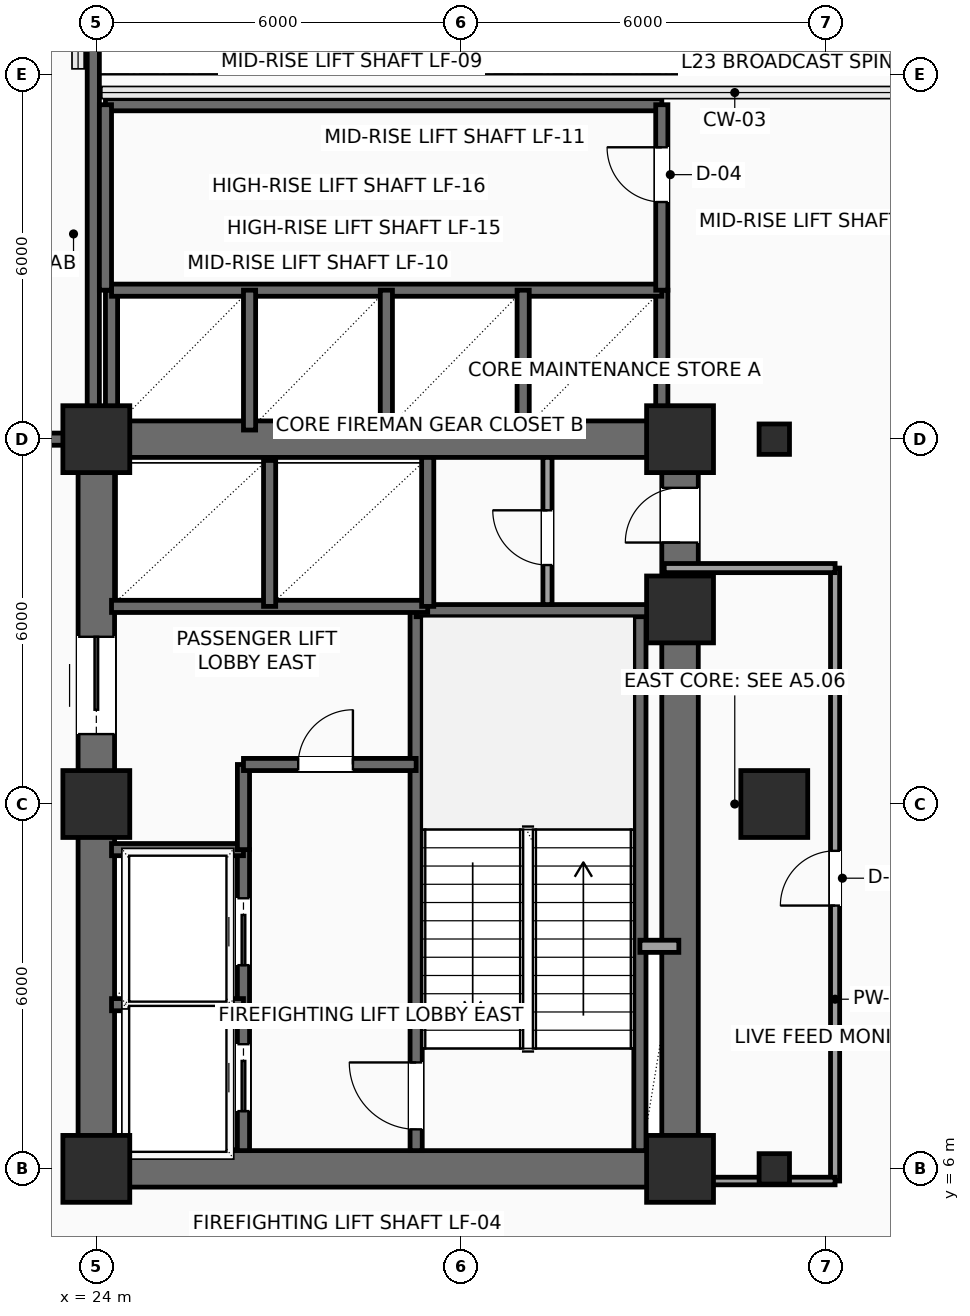
"""IFC4 building model, lengths in metres.
Left out: names, types, materials, properties, quantities, classifications, styles, units other than length and angle.
Written with IfcOpenShell. Run it as: python <this file> out.ifc"""

import sys

from ifc_helpers import new_model, si_unit, direction, frame, frame_2d, origin, origin_2d, place, context, subcontext, project, spatial, rectangle, hollow_rectangle, extrude, element, fill, save


model = new_model("IFC4")
c1 = context("Model", 3, precision=1e-05, world=origin(), true_north=direction((0.0, 1.0)))
c2 = subcontext(c1, "Body", "Model", "MODEL_VIEW")
j1 = project(units=[si_unit("LENGTHUNIT", "METRE"), si_unit("PLANEANGLEUNIT", "RADIAN")], contexts=[c1])
p1 = place(None, origin())
s1 = spatial("IfcSite", under=j1, at=p1, CompositionType="ELEMENT")
p2 = place(p1, origin())
s2 = spatial("IfcBuilding", under=s1, at=p2, CompositionType="ELEMENT")
p3 = place(p2, frame((0.0, 0.0, 99.6)))
s3 = spatial("IfcBuildingStorey", under=s2, at=p3, CompositionType="ELEMENT", Elevation=99.6)
for number, where, z_axis, x_axis in (
    (1, (24.0, 6.0, 0.0), (0.0, 0.0, 1.0), (1.0, 0.0, 0.0)),
    (2, (24.0, 12.0, 0.0), (0.0, 0.0, 1.0), (1.0, 0.0, 0.0)),
    (3, (24.0, 18.0, 0.0), (0.0, 0.0, 1.0), (1.0, 0.0, 0.0)),
    (4, (33.6, 6.0, 0.0), (0.0, 0.0, 1.0), (1.0, 0.0, 0.0)),
    (5, (33.6, 15.2, 0.0), (0.0, 0.0, 1.0), (1.0, 0.0, 0.0)),
    (6, (33.6, 18.0, 0.0), (0.0, 0.0, 1.0), (1.0, 0.0, 0.0)),
):
    element("IfcColumn", number, at=place(p3, frame(where, z_axis=z_axis, x_axis=x_axis)), inside=s3, PredefinedType="COLUMN", context=c2, shape_type="SweptSolid", body=[
        extrude(rectangle(XDim=1.1, YDim=1.1, at=origin_2d()), origin(), (0.0, 0.0, 1.0), 3.75),
    ])
p4 = place(p3, frame((35.15, 6.0, 0.0), z_axis=(0.0, 0.0, 1.0), x_axis=(1.0, 0.0, 0.0)))
e7 = element("IfcColumn", 7, at=p4, inside=s3, PredefinedType="COLUMN", context=c2, shape_type="SweptSolid", body=[
    extrude(hollow_rectangle(XDim=0.5, YDim=0.5, WallThickness=0.025, InnerFilletRadius=0.025, OuterFilletRadius=0.04, at=origin_2d()), origin(), (0.0, 0.0, 1.0), 3.75),
])
p5 = place(p3, frame((35.15, 12.0, 0.0), z_axis=(0.0, 0.0, 1.0), x_axis=(1.0, 0.0, 0.0)))
e8 = element("IfcColumn", 8, at=p5, inside=s3, PredefinedType="COLUMN", context=c2, shape_type="SweptSolid", body=[
    extrude(rectangle(XDim=1.1, YDim=1.1, at=origin_2d()), origin(), (0.0, 0.0, 1.0), 3.75),
])
p6 = place(p3, frame((35.15, 18.0, 0.0), z_axis=(0.0, 0.0, 1.0), x_axis=(1.0, 0.0, 0.0)))
e9 = element("IfcColumn", 9, at=p6, inside=s3, PredefinedType="COLUMN", context=c2, shape_type="SweptSolid", body=[
    extrude(hollow_rectangle(XDim=0.5, YDim=0.5, WallThickness=0.025, InnerFilletRadius=0.025, OuterFilletRadius=0.04, at=origin_2d()), origin(), (0.0, 0.0, 1.0), 3.75),
])
for number, where, z_axis, x_axis in (
    (10, (24.0, 6.0, 0.0), (0.0, 0.0, 1.0), (1.0, 0.0, 0.0)),
    (11, (24.0, 18.0, 0.0), (0.0, 0.0, 1.0), (1.0, 0.0, 0.0)),
):
    element("IfcWall", number, at=place(p3, frame(where, z_axis=z_axis, x_axis=x_axis)), inside=s3, PredefinedType="SHEAR", context=c2, shape_type="SweptSolid", body=[
        extrude(rectangle(XDim=9.6, YDim=0.6, at=frame_2d((4.8, 0.0))), origin(), (0.0, 0.0, 1.0), 3.525),
    ])
p7 = place(p3, frame((24.0, 6.0, 0.0), z_axis=(0.0, 0.0, 1.0), x_axis=(0.0, 1.0, 0.0)))
e12 = element("IfcWall", 12, at=p7, inside=s3, PredefinedType="SHEAR", context=c2, shape_type="SweptSolid", body=[
    extrude(rectangle(XDim=12.0, YDim=0.6, at=frame_2d((6.0, 0.0))), origin(), (0.0, 0.0, 1.0), 3.525),
])
p8 = place(p7, frame((7.15, 0.0, 0.0)))
e13 = element("IfcOpeningElement", 13, at=p8, cuts=e12, PredefinedType="OPENING", context=c2, shape_type="SweptSolid", body=[
    extrude(rectangle(XDim=1.6, YDim=2.3, at=frame_2d((0.8, 1.15))), frame((0.0, 0.31, 0.0), z_axis=(0.0, -1.0, 0.0), x_axis=(1.0, 0.0, 0.0)), (0.0, 0.0, 1.0), 0.62),
])
p9 = place(p3, frame((33.6, 6.0, 0.0), z_axis=(0.0, 0.0, 1.0), x_axis=(0.0, 1.0, 0.0)))
e14 = element("IfcWall", 14, at=p9, inside=s3, PredefinedType="SHEAR", context=c2, shape_type="SweptSolid", body=[
    extrude(rectangle(XDim=12.0, YDim=0.6, at=frame_2d((6.0, 0.0))), origin(), (0.0, 0.0, 1.0), 3.525),
])
p10 = place(p9, frame((10.3, 0.0, 0.0)))
e15 = element("IfcOpeningElement", 15, at=p10, cuts=e14, PredefinedType="OPENING", context=c2, shape_type="SweptSolid", body=[
    extrude(rectangle(XDim=0.9, YDim=2.15, at=frame_2d((0.45, 1.075))), frame((0.0, 0.31, 0.0), z_axis=(0.0, -1.0, 0.0), x_axis=(1.0, 0.0, 0.0)), (0.0, 0.0, 1.0), 0.62),
])
p11 = place(p3, frame((29.26, 6.3, 0.0), z_axis=(0.0, 0.0, 1.0), x_axis=(0.0, 1.0, 0.0)))
e16 = element("IfcWall", 16, at=p11, inside=s3, PredefinedType="SHEAR", context=c2, shape_type="SweptSolid", body=[
    extrude(rectangle(XDim=8.88, YDim=0.2, at=frame_2d((4.44, 0.0))), origin(), (0.0, 0.0, 1.0), 3.525),
])
p12 = place(p11, frame((0.35, 0.0, 0.0)))
e17 = element("IfcOpeningElement", 17, at=p12, cuts=e16, PredefinedType="OPENING", context=c2, shape_type="SweptSolid", body=[
    extrude(rectangle(XDim=1.1, YDim=2.2, at=frame_2d((0.55, 1.1))), frame((0.0, 0.11, 0.0), z_axis=(0.0, -1.0, 0.0), x_axis=(1.0, 0.0, 0.0)), (0.0, 0.0, 1.0), 0.22),
])
p13 = place(p3, frame((32.94, 6.3, 0.0), z_axis=(0.0, 0.0, 1.0), x_axis=(0.0, 1.0, 0.0)))
e18 = element("IfcWall", 18, at=p13, inside=s3, PredefinedType="SHEAR", context=c2, shape_type="SweptSolid", body=[
    extrude(rectangle(XDim=8.88, YDim=0.2, at=frame_2d((4.44, 0.0))), origin(), (0.0, 0.0, 1.0), 3.525),
])
p14 = place(p3, frame((29.26, 15.18, 0.0), z_axis=(0.0, 0.0, 1.0), x_axis=(1.0, 0.0, 0.0)))
e19 = element("IfcWall", 19, at=p14, inside=s3, PredefinedType="SHEAR", context=c2, shape_type="SweptSolid", body=[
    extrude(rectangle(XDim=4.04, YDim=0.2, at=frame_2d((2.02, 0.0))), origin(), (0.0, 0.0, 1.0), 3.525),
])
p15 = place(p3, frame((26.42, 6.3, 0.0), z_axis=(0.0, 0.0, 1.0), x_axis=(0.0, 1.0, 0.0)))
e20 = element("IfcWall", 20, at=p15, inside=s3, PredefinedType="SHEAR", context=c2, shape_type="SweptSolid", body=[
    extrude(rectangle(XDim=4.95, YDim=0.2, at=frame_2d((2.475, 0.0))), origin(), (0.0, 0.0, 1.0), 3.525),
])
p16 = place(p15, frame((0.65, 0.0, 0.0)))
e21 = element("IfcOpeningElement", 21, at=p16, cuts=e20, PredefinedType="OPENING", context=c2, shape_type="SweptSolid", body=[
    extrude(rectangle(XDim=1.1, YDim=2.2, at=frame_2d((0.55, 1.1))), frame((0.0, 0.11, 0.0), z_axis=(0.0, -1.0, 0.0), x_axis=(1.0, 0.0, 0.0)), (0.0, 0.0, 1.0), 0.22),
])
p17 = place(p15, frame((3.05, 0.0, 0.0)))
e22 = element("IfcOpeningElement", 22, at=p17, cuts=e20, PredefinedType="OPENING", context=c2, shape_type="SweptSolid", body=[
    extrude(rectangle(XDim=1.1, YDim=2.2, at=frame_2d((0.55, 1.1))), frame((0.0, 0.11, 0.0), z_axis=(0.0, -1.0, 0.0), x_axis=(1.0, 0.0, 0.0)), (0.0, 0.0, 1.0), 0.22),
])
for number, where, z_axis, x_axis in (
    (23, (24.25, 8.7, 0.0), (0.0, 0.0, 1.0), (1.0, 0.0, 0.0)),
    (24, (24.25, 11.25, 0.0), (0.0, 0.0, 1.0), (1.0, 0.0, 0.0)),
):
    element("IfcWall", number, at=place(p3, frame(where, z_axis=z_axis, x_axis=x_axis)), inside=s3, PredefinedType="SHEAR", context=c2, shape_type="SweptSolid", body=[
        extrude(rectangle(XDim=2.17, YDim=0.2, at=frame_2d((1.085, 0.0))), origin(), (0.0, 0.0, 1.0), 3.525),
    ])
p18 = place(p3, frame((26.42, 11.25, 0.0), z_axis=(0.0, 0.0, 1.0), x_axis=(0.0, 1.0, 0.0)))
e25 = element("IfcWall", 25, at=p18, inside=s3, PredefinedType="SHEAR", context=c2, shape_type="SweptSolid", body=[
    extrude(rectangle(XDim=1.4, YDim=0.2, at=frame_2d((0.7, 0.0))), origin(), (0.0, 0.0, 1.0), 3.525),
])
p19 = place(p3, frame((26.42, 12.65, 0.0), z_axis=(0.0, 0.0, 1.0), x_axis=(1.0, 0.0, 0.0)))
e26 = element("IfcWall", 26, at=p19, inside=s3, PredefinedType="SHEAR", context=c2, shape_type="SweptSolid", body=[
    extrude(rectangle(XDim=2.84, YDim=0.2, at=frame_2d((1.42, 0.0))), origin(), (0.0, 0.0, 1.0), 3.525),
])
p20 = place(p19, frame((0.9, 0.0, 0.0)))
e27 = element("IfcOpeningElement", 27, at=p20, cuts=e26, PredefinedType="OPENING", context=c2, shape_type="SweptSolid", body=[
    extrude(rectangle(XDim=0.9, YDim=2.15, at=frame_2d((0.45, 1.075))), frame((0.0, 0.11, 0.0), z_axis=(0.0, -1.0, 0.0), x_axis=(1.0, 0.0, 0.0)), (0.0, 0.0, 1.0), 0.22),
])
p21 = place(p3, frame((32.94, 9.66, 0.0), z_axis=(0.0, 0.0, 1.0), x_axis=(1.0, 0.0, 0.0)))
e28 = element("IfcWall", 28, at=p21, inside=s3, PredefinedType="SOLIDWALL", context=c2, shape_type="SweptSolid", body=[
    extrude(rectangle(XDim=0.64, YDim=0.2, at=frame_2d((0.32, 0.0))), origin(), (0.0, 0.0, 1.0), 3.525),
])
p22 = place(p3, frame((24.25, 15.25, 0.0), z_axis=(0.0, 0.0, 1.0), x_axis=(1.0, 0.0, 0.0)))
e29 = element("IfcWall", 29, at=p22, inside=s3, PredefinedType="SHEAR", context=c2, shape_type="SweptSolid", body=[
    extrude(rectangle(XDim=5.2, YDim=0.2, at=frame_2d((2.6, 0.0))), origin(), (0.0, 0.0, 1.0), 3.525),
])
p23 = place(p3, frame((26.85, 15.25, 0.0), z_axis=(0.0, 0.0, 1.0), x_axis=(0.0, 1.0, 0.0)))
e30 = element("IfcWall", 30, at=p23, inside=s3, PredefinedType="SHEAR", context=c2, shape_type="SweptSolid", body=[
    extrude(rectangle(XDim=2.4, YDim=0.2, at=frame_2d((1.2, 0.0))), origin(), (0.0, 0.0, 1.0), 3.525),
])
p24 = place(p3, frame((29.45, 15.25, 0.0), z_axis=(0.0, 0.0, 1.0), x_axis=(0.0, 1.0, 0.0)))
e31 = element("IfcWall", 31, at=p24, inside=s3, PredefinedType="SHEAR", context=c2, shape_type="SweptSolid", body=[
    extrude(rectangle(XDim=2.45, YDim=0.2, at=frame_2d((1.225, 0.0))), origin(), (0.0, 0.0, 1.0), 3.525),
])
p25 = place(p3, frame((31.42, 15.28, 0.0), z_axis=(0.0, 0.0, 1.0), x_axis=(0.0, 1.0, 0.0)))
e32 = element("IfcWall", 32, at=p25, inside=s3, PredefinedType="PARTITIONING", context=c2, shape_type="SweptSolid", body=[
    extrude(rectangle(XDim=2.42, YDim=0.15, at=frame_2d((1.21, 0.0))), origin(), (0.0, 0.0, 1.0), 3.525),
])
p26 = place(p25, frame((0.65, 0.0, 0.0)))
e33 = element("IfcOpeningElement", 33, at=p26, cuts=e32, PredefinedType="OPENING", context=c2, shape_type="SweptSolid", body=[
    extrude(rectangle(XDim=0.9, YDim=2.15, at=frame_2d((0.45, 1.075))), frame((0.0, 0.085, 0.0), z_axis=(0.0, -1.0, 0.0), x_axis=(1.0, 0.0, 0.0)), (0.0, 0.0, 1.0), 0.17),
])
p27 = place(p3, frame((20.45, 18.0, 0.0), z_axis=(0.0, 0.0, 1.0), x_axis=(1.0, 0.0, 0.0)))
e34 = element("IfcWall", 34, at=p27, inside=s3, PredefinedType="SHEAR", context=c2, shape_type="SweptSolid", body=[
    extrude(rectangle(XDim=3.5, YDim=0.2, at=frame_2d((1.75, 0.0))), origin(), (0.0, 0.0, 1.0), 3.525),
])
p28 = place(p27, frame((0.95, 0.0, 0.0)))
e35 = element("IfcOpeningElement", 35, at=p28, cuts=e34, PredefinedType="OPENING", context=c2, shape_type="SweptSolid", body=[
    extrude(rectangle(XDim=1.6, YDim=2.3, at=frame_2d((0.8, 1.15))), frame((0.0, 0.11, 0.0), z_axis=(0.0, -1.0, 0.0), x_axis=(1.0, 0.0, 0.0)), (0.0, 0.0, 1.0), 0.22),
])
p29 = place(p3, frame((23.95, 18.0, 0.0), z_axis=(0.0, 0.0, 1.0), x_axis=(0.0, 1.0, 0.0)))
e36 = element("IfcWall", 36, at=p29, inside=s3, PredefinedType="SHEAR", context=c2, shape_type="SweptSolid", body=[
    extrude(rectangle(XDim=9.3, YDim=0.2, at=frame_2d((4.65, 0.0))), origin(), (0.0, 0.0, 1.0), 3.525),
])
for number, where, z_axis, x_axis in (
    (37, (33.3, 18.1, 0.0), (0.0, 0.0, 1.0), (0.0, 1.0, 0.0)),
    (38, (24.25, 18.1, 0.0), (0.0, 0.0, 1.0), (0.0, 1.0, 0.0)),
):
    element("IfcWall", number, at=place(p3, frame(where, z_axis=z_axis, x_axis=x_axis)), inside=s3, PredefinedType="SHEAR", context=c2, shape_type="SweptSolid", body=[
        extrude(rectangle(XDim=2.35, YDim=0.2, at=frame_2d((1.175, 0.0))), origin(), (0.0, 0.0, 1.0), 3.525),
    ])
p30 = place(p3, frame((24.25, 20.45, 0.0), z_axis=(0.0, 0.0, 1.0), x_axis=(1.0, 0.0, 0.0)))
e39 = element("IfcWall", 39, at=p30, inside=s3, PredefinedType="SHEAR", context=c2, shape_type="SweptSolid", body=[
    extrude(rectangle(XDim=9.05, YDim=0.2, at=frame_2d((4.525, 0.0))), origin(), (0.0, 0.0, 1.0), 3.525),
])
for number, where, z_axis, x_axis in (
    (40, (26.52, 18.15, 0.0), (0.0, 0.0, 1.0), (0.0, 1.0, 0.0)),
    (41, (28.77, 18.15, 0.0), (0.0, 0.0, 1.0), (0.0, 1.0, 0.0)),
    (42, (31.02, 18.15, 0.0), (0.0, 0.0, 1.0), (0.0, 1.0, 0.0)),
):
    element("IfcWall", number, at=place(p3, frame(where, z_axis=z_axis, x_axis=x_axis)), inside=s3, PredefinedType="SHEAR", context=c2, shape_type="SweptSolid", body=[
        extrude(rectangle(XDim=2.3, YDim=0.2, at=frame_2d((1.15, 0.0))), origin(), (0.0, 0.0, 1.0), 3.525),
    ])
p31 = place(p3, frame((24.15, 23.5, 0.0), z_axis=(0.0, 0.0, 1.0), x_axis=(1.0, 0.0, 0.0)))
e43 = element("IfcWall", 43, at=p31, inside=s3, PredefinedType="SHEAR", context=c2, shape_type="SweptSolid", body=[
    extrude(rectangle(XDim=9.15, YDim=0.2, at=frame_2d((4.575, 0.0))), origin(), (0.0, 0.0, 1.0), 3.525),
])
p32 = place(p3, frame((33.3, 20.45, 0.0), z_axis=(0.0, 0.0, 1.0), x_axis=(0.0, 1.0, 0.0)))
e44 = element("IfcWall", 44, at=p32, inside=s3, PredefinedType="SHEAR", context=c2, shape_type="SweptSolid", body=[
    extrude(rectangle(XDim=3.05, YDim=0.2, at=frame_2d((1.525, 0.0))), origin(), (0.0, 0.0, 1.0), 3.525),
])
p33 = place(p32, frame((1.45, 0.0, 0.0)))
e45 = element("IfcOpeningElement", 45, at=p33, cuts=e44, PredefinedType="OPENING", context=c2, shape_type="SweptSolid", body=[
    extrude(rectangle(XDim=0.9, YDim=2.15, at=frame_2d((0.45, 1.075))), frame((0.0, 0.11, 0.0), z_axis=(0.0, -1.0, 0.0), x_axis=(1.0, 0.0, 0.0)), (0.0, 0.0, 1.0), 0.22),
])
p34 = place(p3, frame((24.15, 20.45, 0.0), z_axis=(0.0, 0.0, 1.0), x_axis=(0.0, 1.0, 0.0)))
e46 = element("IfcWall", 46, at=p34, inside=s3, PredefinedType="SHEAR", context=c2, shape_type="SweptSolid", body=[
    extrude(rectangle(XDim=3.05, YDim=0.2, at=frame_2d((1.525, 0.0))), origin(), (0.0, 0.0, 1.0), 3.525),
])
p35 = place(p3, frame((36.15, 5.8, 0.0), z_axis=(0.0, 0.0, 1.0), x_axis=(0.0, 1.0, 0.0)))
e47 = element("IfcWall", 47, at=p35, inside=s3, PredefinedType="PARTITIONING", context=c2, shape_type="SweptSolid", body=[
    extrude(rectangle(XDim=10.08, YDim=0.15, at=frame_2d((5.04, 0.0))), origin(), (0.0, 0.0, 1.0), 3.525),
])
p36 = place(p35, frame((4.53, 0.0, 0.0)))
e48 = element("IfcOpeningElement", 48, at=p36, cuts=e47, PredefinedType="OPENING", context=c2, shape_type="SweptSolid", body=[
    extrude(rectangle(XDim=0.9, YDim=2.1, at=frame_2d((0.45, 1.05))), frame((0.0, 0.085, 0.0), z_axis=(0.0, -1.0, 0.0), x_axis=(1.0, 0.0, 0.0)), (0.0, 0.0, 1.0), 0.17),
])
p37 = place(p3, frame((36.15, 15.88, 0.0), z_axis=(0.0, 0.0, 1.0), x_axis=(-1.0, 0.0, 0.0)))
e49 = element("IfcWall", 49, at=p37, inside=s3, PredefinedType="PARTITIONING", context=c2, shape_type="SweptSolid", body=[
    extrude(rectangle(XDim=2.81, YDim=0.15, at=frame_2d((1.405, 0.0))), origin(), (0.0, 0.0, 1.0), 3.525),
])
p38 = place(p3, frame((33.65, 5.8, 0.0), z_axis=(0.0, 0.0, 1.0), x_axis=(1.0, 0.0, 0.0)))
e50 = element("IfcWall", 50, at=p38, inside=s3, PredefinedType="PARTITIONING", context=c2, shape_type="SweptSolid", body=[
    extrude(rectangle(XDim=2.5, YDim=0.125, at=frame_2d((1.25, 0.0))), origin(), (0.0, 0.0, 1.0), 3.017),
])
p39 = place(p8, origin())
e51 = element("IfcDoor", 51, at=p39, inside=s3, OperationType="DOUBLE_DOOR_SLIDING", PredefinedType="DOOR", context=c2, shape_type="SweptSolid", body=[
    extrude(rectangle(XDim=1.6, YDim=2.3, at=frame_2d((0.8, 1.15))), frame((0.0, 0.025, 0.0), z_axis=(0.0, -1.0, 0.0), x_axis=(1.0, 0.0, 0.0)), (0.0, 0.0, 1.0), 0.05),
])
fill(e13, e51)
p40 = place(p10, origin())
e52 = element("IfcDoor", 52, at=p40, inside=s3, OperationType="SINGLE_SWING_LEFT", PredefinedType="DOOR", context=c2, shape_type="SweptSolid", body=[
    extrude(rectangle(XDim=0.9, YDim=2.15, at=frame_2d((0.45, 1.075))), frame((0.0, 0.025, 0.0), z_axis=(0.0, -1.0, 0.0), x_axis=(1.0, 0.0, 0.0)), (0.0, 0.0, 1.0), 0.05),
])
fill(e15, e52)
p41 = place(p12, origin())
e53 = element("IfcDoor", 53, at=p41, inside=s3, OperationType="SINGLE_SWING_RIGHT", PredefinedType="DOOR", context=c2, shape_type="SweptSolid", body=[
    extrude(rectangle(XDim=1.1, YDim=2.2, at=frame_2d((0.55, 1.1))), frame((0.0, 0.025, 0.0), z_axis=(0.0, -1.0, 0.0), x_axis=(1.0, 0.0, 0.0)), (0.0, 0.0, 1.0), 0.05),
])
fill(e17, e53)
p42 = place(p16, origin())
e54 = element("IfcDoor", 54, at=p42, inside=s3, OperationType="SLIDING_TO_LEFT", PredefinedType="DOOR", context=c2, shape_type="SweptSolid", body=[
    extrude(rectangle(XDim=1.1, YDim=2.2, at=frame_2d((0.55, 1.1))), frame((0.0, 0.025, 0.0), z_axis=(0.0, -1.0, 0.0), x_axis=(1.0, 0.0, 0.0)), (0.0, 0.0, 1.0), 0.05),
])
fill(e21, e54)
p43 = place(p17, origin())
e55 = element("IfcDoor", 55, at=p43, inside=s3, OperationType="SLIDING_TO_LEFT", PredefinedType="DOOR", context=c2, shape_type="SweptSolid", body=[
    extrude(rectangle(XDim=1.1, YDim=2.2, at=frame_2d((0.55, 1.1))), frame((0.0, 0.025, 0.0), z_axis=(0.0, -1.0, 0.0), x_axis=(1.0, 0.0, 0.0)), (0.0, 0.0, 1.0), 0.05),
])
fill(e22, e55)
p44 = place(p20, origin())
e56 = element("IfcDoor", 56, at=p44, inside=s3, OperationType="SINGLE_SWING_RIGHT", PredefinedType="DOOR", context=c2, shape_type="SweptSolid", body=[
    extrude(rectangle(XDim=0.9, YDim=2.15, at=frame_2d((0.45, 1.075))), frame((0.0, 0.025, 0.0), z_axis=(0.0, -1.0, 0.0), x_axis=(1.0, 0.0, 0.0)), (0.0, 0.0, 1.0), 0.05),
])
fill(e27, e56)
p45 = place(p26, origin())
e57 = element("IfcDoor", 57, at=p45, inside=s3, OperationType="SINGLE_SWING_RIGHT", PredefinedType="DOOR", context=c2, shape_type="SweptSolid", body=[
    extrude(rectangle(XDim=0.9, YDim=2.15, at=frame_2d((0.45, 1.075))), frame((0.0, 0.025, 0.0), z_axis=(0.0, -1.0, 0.0), x_axis=(1.0, 0.0, 0.0)), (0.0, 0.0, 1.0), 0.05),
])
fill(e33, e57)
p46 = place(p33, origin())
e58 = element("IfcDoor", 58, at=p46, inside=s3, OperationType="SINGLE_SWING_RIGHT", PredefinedType="DOOR", context=c2, shape_type="SweptSolid", body=[
    extrude(rectangle(XDim=0.9, YDim=2.15, at=frame_2d((0.45, 1.075))), frame((0.0, 0.025, 0.0), z_axis=(0.0, -1.0, 0.0), x_axis=(1.0, 0.0, 0.0)), (0.0, 0.0, 1.0), 0.05),
])
fill(e45, e58)
p47 = place(p36, origin())
e59 = element("IfcDoor", 59, at=p47, inside=s3, OperationType="SINGLE_SWING_LEFT", PredefinedType="DOOR", context=c2, shape_type="SweptSolid", body=[
    extrude(rectangle(XDim=0.9, YDim=2.1, at=frame_2d((0.45, 1.05))), frame((0.0, 0.025, 0.0), z_axis=(0.0, -1.0, 0.0), x_axis=(1.0, 0.0, 0.0)), (0.0, 0.0, 1.0), 0.05),
])
fill(e48, e59)
save(model, sys.argv[1])
